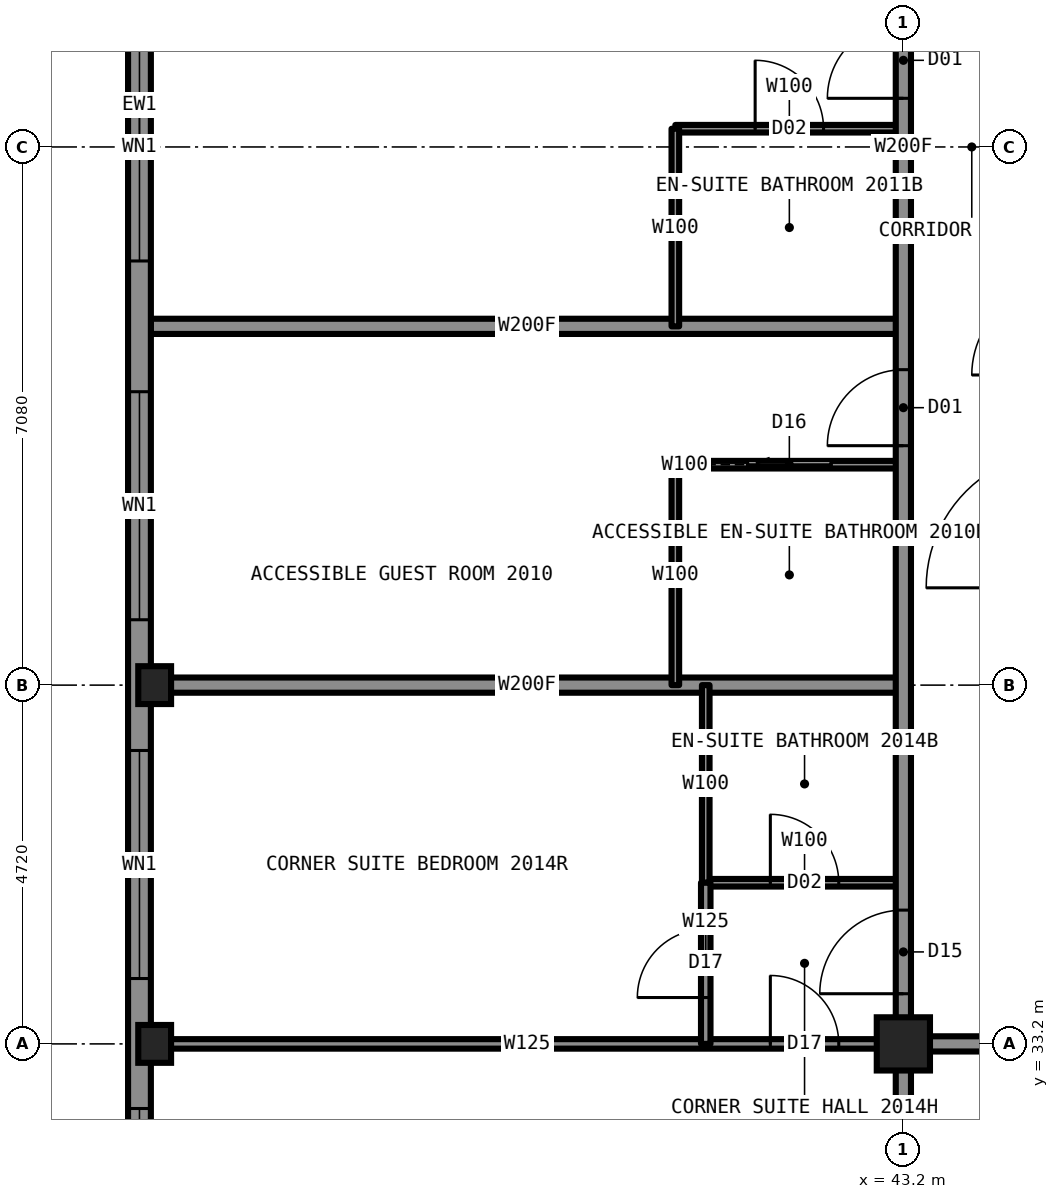
"""IFC4 building model, lengths in metres.
Left out: names, types, materials, properties, quantities, classifications, styles, units other than length and angle.
Written with IfcOpenShell. Run it as: python <this file> out.ifc"""

import sys

from ifc_helpers import new_model, si_unit, direction, frame, frame_2d, origin, origin_2d, place, context, subcontext, project, spatial, rectangle, hollow_rectangle, i_section, extrude, element, fill, save


model = new_model("IFC4")
c1 = context("Model", 3, precision=1e-05, world=origin(), true_north=direction((0.0, 1.0)))
c2 = subcontext(c1, "Body", "Model", "MODEL_VIEW")
j1 = project(units=[si_unit("LENGTHUNIT", "METRE"), si_unit("PLANEANGLEUNIT", "RADIAN")], contexts=[c1])
p1 = place(None, origin())
s1 = spatial("IfcSite", under=j1, at=p1, CompositionType="ELEMENT")
p2 = place(p1, origin())
s2 = spatial("IfcBuilding", under=s1, at=p2, CompositionType="ELEMENT")
p3 = place(p2, frame((0.0, 0.0, 70.5)))
s3 = spatial("IfcBuildingStorey", under=s2, at=p3, CompositionType="ELEMENT", Elevation=70.5)
for number, where, z_axis, x_axis in (
    (1, (33.35, 33.2, 0.0), (0.0, 0.0, 1.0), (1.0, 0.0, 0.0)),
    (2, (33.35, 37.92, 0.0), (0.0, 0.0, 1.0), (1.0, 0.0, 0.0)),
):
    element("IfcColumn", number, at=place(p3, frame(where, z_axis=z_axis, x_axis=x_axis)), inside=s3, PredefinedType="COLUMN", context=c2, shape_type="SweptSolid", body=[
        extrude(i_section(OverallWidth=0.432, OverallDepth=0.498, WebThickness=0.056, FlangeThickness=0.089, at=origin_2d()), origin(), (0.0, 0.0, 1.0), 3.5),
    ])
p4 = place(p3, frame((43.2, 33.2, 0.0), z_axis=(0.0, 0.0, 1.0), x_axis=(1.0, 0.0, 0.0)))
e3 = element("IfcColumn", 3, at=p4, inside=s3, PredefinedType="COLUMN", context=c2, shape_type="SweptSolid", body=[
    extrude(hollow_rectangle(XDim=0.7, YDim=0.7, WallThickness=0.06, at=origin_2d()), origin(), (0.0, 0.0, 1.0), 3.5),
])
p5 = place(p3, frame((43.2, 33.2, 0.0), z_axis=(0.0, 0.0, 1.0), x_axis=(1.0, 0.0, 0.0)))
e4 = element("IfcWall", 4, at=p5, inside=s3, PredefinedType="PARTITIONING", context=c2, shape_type="SweptSolid", body=[
    extrude(rectangle(XDim=23.6, YDim=0.2, at=frame_2d((11.8, 0.0))), origin(), (0.0, 0.0, 1.0), 3.33),
])
p6 = place(p5, frame((2.55, 0.0, 0.0)))
e5 = element("IfcOpeningElement", 5, at=p6, cuts=e4, PredefinedType="OPENING", context=c2, shape_type="SweptSolid", body=[
    extrude(rectangle(XDim=1.0, YDim=2.2, at=frame_2d((0.5, 1.1))), frame((0.0, 0.11, 0.0), z_axis=(0.0, -1.0, 0.0), x_axis=(1.0, 0.0, 0.0)), (0.0, 0.0, 1.0), 0.22),
])
p7 = place(p5, frame((5.12, 0.0, 0.0)))
e6 = element("IfcOpeningElement", 6, at=p7, cuts=e4, PredefinedType="OPENING", context=c2, shape_type="SweptSolid", body=[
    extrude(rectangle(XDim=1.0, YDim=2.2, at=frame_2d((0.5, 1.1))), frame((0.0, 0.11, 0.0), z_axis=(0.0, -1.0, 0.0), x_axis=(1.0, 0.0, 0.0)), (0.0, 0.0, 1.0), 0.22),
])
p8 = place(p5, frame((11.7, 0.0, 0.0)))
e7 = element("IfcOpeningElement", 7, at=p8, cuts=e4, PredefinedType="OPENING", context=c2, shape_type="SweptSolid", body=[
    extrude(rectangle(XDim=1.0, YDim=2.2, at=frame_2d((0.5, 1.1))), frame((0.0, 0.11, 0.0), z_axis=(0.0, -1.0, 0.0), x_axis=(1.0, 0.0, 0.0)), (0.0, 0.0, 1.0), 0.22),
])
p9 = place(p5, frame((16.42, 0.0, 0.0)))
e8 = element("IfcOpeningElement", 8, at=p9, cuts=e4, PredefinedType="OPENING", context=c2, shape_type="SweptSolid", body=[
    extrude(rectangle(XDim=1.0, YDim=2.2, at=frame_2d((0.5, 1.1))), frame((0.0, 0.11, 0.0), z_axis=(0.0, -1.0, 0.0), x_axis=(1.0, 0.0, 0.0)), (0.0, 0.0, 1.0), 0.22),
])
p10 = place(p5, frame((21.43, 0.0, 0.0)))
e9 = element("IfcOpeningElement", 9, at=p10, cuts=e4, PredefinedType="OPENING", context=c2, shape_type="SweptSolid", body=[
    extrude(rectangle(XDim=1.0, YDim=2.2, at=frame_2d((0.5, 1.1))), frame((0.0, 0.11, 0.0), z_axis=(0.0, -1.0, 0.0), x_axis=(1.0, 0.0, 0.0)), (0.0, 0.0, 1.0), 0.22),
])
p11 = place(p3, frame((33.3, 33.2, 0.0), z_axis=(0.0, 0.0, 1.0), x_axis=(1.0, 0.0, 0.0)))
e10 = element("IfcWall", 10, at=p11, inside=s3, PredefinedType="PARTITIONING", context=c2, shape_type="SweptSolid", body=[
    extrude(rectangle(XDim=9.9, YDim=0.125, at=frame_2d((4.95, 0.0))), origin(), (0.0, 0.0, 1.0), 2.573),
])
p12 = place(p11, frame((8.15, 0.0, 0.0)))
e11 = element("IfcOpeningElement", 11, at=p12, cuts=e10, PredefinedType="OPENING", context=c2, shape_type="SweptSolid", body=[
    extrude(rectangle(XDim=0.9, YDim=2.2, at=frame_2d((0.45, 1.1))), frame((0.0, 0.073, 0.0), z_axis=(0.0, -1.0, 0.0), x_axis=(1.0, 0.0, 0.0)), (0.0, 0.0, 1.0), 0.145),
])
p13 = place(p3, frame((33.3, 42.64, 0.0), z_axis=(0.0, 0.0, 1.0), x_axis=(1.0, 0.0, 0.0)))
e12 = element("IfcWall", 12, at=p13, inside=s3, PredefinedType="PARTITIONING", context=c2, shape_type="SweptSolid", body=[
    extrude(rectangle(XDim=9.9, YDim=0.2, at=frame_2d((4.95, 0.0))), origin(), (0.0, 0.0, 1.0), 2.723),
])
p14 = place(p3, frame((40.2, 40.82, 0.0), z_axis=(0.0, 0.0, 1.0), x_axis=(1.0, 0.0, 0.0)))
e13 = element("IfcWall", 13, at=p14, inside=s3, PredefinedType="PARTITIONING", context=c2, shape_type="SweptSolid", body=[
    extrude(rectangle(XDim=3.0, YDim=0.1, at=frame_2d((1.5, 0.0))), origin(), (0.0, 0.0, 1.0), 3.33),
])
p15 = place(p14, frame((0.95, 0.0, 0.0)))
e14 = element("IfcOpeningElement", 14, at=p15, cuts=e13, PredefinedType="OPENING", context=c2, shape_type="SweptSolid", body=[
    extrude(rectangle(XDim=1.1, YDim=2.1, at=frame_2d((0.55, 1.05))), frame((0.0, 0.06, 0.0), z_axis=(0.0, -1.0, 0.0), x_axis=(1.0, 0.0, 0.0)), (0.0, 0.0, 1.0), 0.12),
])
p16 = place(p3, frame((33.3, 37.92, 0.0), z_axis=(0.0, 0.0, 1.0), x_axis=(1.0, 0.0, 0.0)))
e15 = element("IfcWall", 15, at=p16, inside=s3, PredefinedType="PARTITIONING", context=c2, shape_type="SweptSolid", body=[
    extrude(rectangle(XDim=9.9, YDim=0.2, at=frame_2d((4.95, 0.0))), origin(), (0.0, 0.0, 1.0), 2.573),
])
p17 = place(p3, frame((40.6, 35.32, 0.0), z_axis=(0.0, 0.0, 1.0), x_axis=(1.0, 0.0, 0.0)))
e16 = element("IfcWall", 16, at=p17, inside=s3, PredefinedType="PARTITIONING", context=c2, shape_type="SweptSolid", body=[
    extrude(rectangle(XDim=2.6, YDim=0.1, at=frame_2d((1.3, 0.0))), origin(), (0.0, 0.0, 1.0), 3.33),
])
p18 = place(p17, frame((0.85, 0.0, 0.0)))
e17 = element("IfcOpeningElement", 17, at=p18, cuts=e16, PredefinedType="OPENING", context=c2, shape_type="SweptSolid", body=[
    extrude(rectangle(XDim=0.9, YDim=2.1, at=frame_2d((0.45, 1.05))), frame((0.0, 0.06, 0.0), z_axis=(0.0, -1.0, 0.0), x_axis=(1.0, 0.0, 0.0)), (0.0, 0.0, 1.0), 0.12),
])
p19 = place(p3, frame((40.2, 45.24, 0.0), z_axis=(0.0, 0.0, 1.0), x_axis=(1.0, 0.0, 0.0)))
e18 = element("IfcWall", 18, at=p19, inside=s3, PredefinedType="PARTITIONING", context=c2, shape_type="SweptSolid", body=[
    extrude(rectangle(XDim=3.0, YDim=0.1, at=frame_2d((1.5, 0.0))), origin(), (0.0, 0.0, 1.0), 3.33),
])
p20 = place(p19, frame((1.05, 0.0, 0.0)))
e19 = element("IfcOpeningElement", 19, at=p20, cuts=e18, PredefinedType="OPENING", context=c2, shape_type="SweptSolid", body=[
    extrude(rectangle(XDim=0.9, YDim=2.1, at=frame_2d((0.45, 1.05))), frame((0.0, 0.06, 0.0), z_axis=(0.0, -1.0, 0.0), x_axis=(1.0, 0.0, 0.0)), (0.0, 0.0, 1.0), 0.12),
])
p21 = place(p3, frame((43.2, 33.2, 0.0), z_axis=(0.0, 0.0, 1.0), x_axis=(0.0, 1.0, 0.0)))
e20 = element("IfcWall", 20, at=p21, inside=s3, PredefinedType="PARTITIONING", context=c2, shape_type="SweptSolid", body=[
    extrude(rectangle(XDim=23.6, YDim=0.2, at=frame_2d((11.8, 0.0))), origin(), (0.0, 0.0, 1.0), 3.33),
])
p22 = place(p21, frame((7.87, 0.0, 0.0)))
e21 = element("IfcOpeningElement", 21, at=p22, cuts=e20, PredefinedType="OPENING", context=c2, shape_type="SweptSolid", body=[
    extrude(rectangle(XDim=1.0, YDim=2.2, at=frame_2d((0.5, 1.1))), frame((0.0, 0.11, 0.0), z_axis=(0.0, -1.0, 0.0), x_axis=(1.0, 0.0, 0.0)), (0.0, 0.0, 1.0), 0.22),
])
p23 = place(p21, frame((12.44, 0.0, 0.0)))
e22 = element("IfcOpeningElement", 22, at=p23, cuts=e20, PredefinedType="OPENING", context=c2, shape_type="SweptSolid", body=[
    extrude(rectangle(XDim=1.0, YDim=2.2, at=frame_2d((0.5, 1.1))), frame((0.0, 0.11, 0.0), z_axis=(0.0, -1.0, 0.0), x_axis=(1.0, 0.0, 0.0)), (0.0, 0.0, 1.0), 0.22),
])
p24 = place(p21, frame((21.85, 0.0, 0.0)))
e23 = element("IfcOpeningElement", 23, at=p24, cuts=e20, PredefinedType="OPENING", context=c2, shape_type="SweptSolid", body=[
    extrude(rectangle(XDim=1.1, YDim=2.2, at=frame_2d((0.55, 1.1))), frame((0.0, 0.11, 0.0), z_axis=(0.0, -1.0, 0.0), x_axis=(1.0, 0.0, 0.0)), (0.0, 0.0, 1.0), 0.22),
])
p25 = place(p21, frame((0.66, 0.0, 0.0)))
e24 = element("IfcOpeningElement", 24, at=p25, cuts=e20, PredefinedType="OPENING", context=c2, shape_type="SweptSolid", body=[
    extrude(rectangle(XDim=1.1, YDim=2.2, at=frame_2d((0.55, 1.1))), frame((0.0, 0.11, 0.0), z_axis=(0.0, -1.0, 0.0), x_axis=(1.0, 0.0, 0.0)), (0.0, 0.0, 1.0), 0.22),
])
p26 = place(p3, frame((43.2, 23.3, 0.0), z_axis=(0.0, 0.0, 1.0), x_axis=(0.0, 1.0, 0.0)))
e25 = element("IfcWall", 25, at=p26, inside=s3, PredefinedType="PARTITIONING", context=c2, shape_type="SweptSolid", body=[
    extrude(rectangle(XDim=9.9, YDim=0.2, at=frame_2d((4.95, 0.0))), origin(), (0.0, 0.0, 1.0), 2.573),
])
p27 = place(p3, frame((40.6, 35.32, 0.0), z_axis=(0.0, 0.0, 1.0), x_axis=(0.0, 1.0, 0.0)))
e26 = element("IfcWall", 26, at=p27, inside=s3, PredefinedType="PARTITIONING", context=c2, shape_type="SweptSolid", body=[
    extrude(rectangle(XDim=2.6, YDim=0.1, at=frame_2d((1.3, 0.0))), origin(), (0.0, 0.0, 1.0), 3.33),
])
p28 = place(p3, frame((40.6, 33.2, 0.0), z_axis=(0.0, 0.0, 1.0), x_axis=(0.0, 1.0, 0.0)))
e27 = element("IfcWall", 27, at=p28, inside=s3, PredefinedType="PARTITIONING", context=c2, shape_type="SweptSolid", body=[
    extrude(rectangle(XDim=2.12, YDim=0.125, at=frame_2d((1.06, 0.0))), origin(), (0.0, 0.0, 1.0), 3.33),
])
p29 = place(p28, frame((0.61, 0.0, 0.0)))
e28 = element("IfcOpeningElement", 28, at=p29, cuts=e27, PredefinedType="OPENING", context=c2, shape_type="SweptSolid", body=[
    extrude(rectangle(XDim=0.9, YDim=2.2, at=frame_2d((0.45, 1.1))), frame((0.0, 0.073, 0.0), z_axis=(0.0, -1.0, 0.0), x_axis=(1.0, 0.0, 0.0)), (0.0, 0.0, 1.0), 0.145),
])
p30 = place(p3, frame((40.2, 37.92, 0.0), z_axis=(0.0, 0.0, 1.0), x_axis=(0.0, 1.0, 0.0)))
e29 = element("IfcWall", 29, at=p30, inside=s3, PredefinedType="PARTITIONING", context=c2, shape_type="SweptSolid", body=[
    extrude(rectangle(XDim=2.9, YDim=0.1, at=frame_2d((1.45, 0.0))), origin(), (0.0, 0.0, 1.0), 3.33),
])
p31 = place(p3, frame((40.2, 42.64, 0.0), z_axis=(0.0, 0.0, 1.0), x_axis=(0.0, 1.0, 0.0)))
e30 = element("IfcWall", 30, at=p31, inside=s3, PredefinedType="PARTITIONING", context=c2, shape_type="SweptSolid", body=[
    extrude(rectangle(XDim=2.6, YDim=0.1, at=frame_2d((1.3, 0.0))), origin(), (0.0, 0.0, 1.0), 3.33),
])
p32 = place(p3, frame((33.15, 61.5, 0.0), z_axis=(0.0, 0.0, 1.0), x_axis=(0.0, -1.0, 0.0)))
e31 = element("IfcWall", 31, at=p32, inside=s3, PredefinedType="SOLIDWALL", context=c2, shape_type="SweptSolid", body=[
    extrude(rectangle(XDim=33.0, YDim=0.3, at=frame_2d((16.5, 0.0))), origin(), (0.0, 0.0, 1.0), 2.83),
])
p33 = place(p32, frame((0.85, 0.0, 0.5)))
e32 = element("IfcOpeningElement", 32, at=p33, cuts=e31, PredefinedType="OPENING", context=c2, shape_type="SweptSolid", body=[
    extrude(rectangle(XDim=2.9, YDim=2.0, at=frame_2d((1.45, 1.0))), frame((0.0, 0.16, 0.0), z_axis=(0.0, -1.0, 0.0), x_axis=(1.0, 0.0, 0.0)), (0.0, 0.0, 1.0), 0.32),
])
p34 = place(p32, frame((6.96, 0.0, 0.55)))
e33 = element("IfcOpeningElement", 33, at=p34, cuts=e31, PredefinedType="OPENING", context=c2, shape_type="SweptSolid", body=[
    extrude(rectangle(XDim=1.6, YDim=1.9, at=frame_2d((0.8, 0.95))), frame((0.0, 0.16, 0.0), z_axis=(0.0, -1.0, 0.0), x_axis=(1.0, 0.0, 0.0)), (0.0, 0.0, 1.0), 0.32),
])
p35 = place(p32, frame((10.28, 0.0, 0.5)))
e34 = element("IfcOpeningElement", 34, at=p35, cuts=e31, PredefinedType="OPENING", context=c2, shape_type="SweptSolid", body=[
    extrude(rectangle(XDim=3.0, YDim=2.0, at=frame_2d((1.5, 1.0))), frame((0.0, 0.16, 0.0), z_axis=(0.0, -1.0, 0.0), x_axis=(1.0, 0.0, 0.0)), (0.0, 0.0, 1.0), 0.32),
])
p36 = place(p32, frame((15.0, 0.0, 0.5)))
e35 = element("IfcOpeningElement", 35, at=p36, cuts=e31, PredefinedType="OPENING", context=c2, shape_type="SweptSolid", body=[
    extrude(rectangle(XDim=3.0, YDim=2.0, at=frame_2d((1.5, 1.0))), frame((0.0, 0.16, 0.0), z_axis=(0.0, -1.0, 0.0), x_axis=(1.0, 0.0, 0.0)), (0.0, 0.0, 1.0), 0.32),
])
p37 = place(p32, frame((19.72, 0.0, 0.5)))
e36 = element("IfcOpeningElement", 36, at=p37, cuts=e31, PredefinedType="OPENING", context=c2, shape_type="SweptSolid", body=[
    extrude(rectangle(XDim=3.0, YDim=2.0, at=frame_2d((1.5, 1.0))), frame((0.0, 0.16, 0.0), z_axis=(0.0, -1.0, 0.0), x_axis=(1.0, 0.0, 0.0)), (0.0, 0.0, 1.0), 0.32),
])
p38 = place(p32, frame((24.44, 0.0, 0.55)))
e37 = element("IfcOpeningElement", 37, at=p38, cuts=e31, PredefinedType="OPENING", context=c2, shape_type="SweptSolid", body=[
    extrude(rectangle(XDim=1.6, YDim=1.9, at=frame_2d((0.8, 0.95))), frame((0.0, 0.16, 0.0), z_axis=(0.0, -1.0, 0.0), x_axis=(1.0, 0.0, 0.0)), (0.0, 0.0, 1.0), 0.32),
])
p39 = place(p32, frame((29.25, 0.0, 0.5)))
e38 = element("IfcOpeningElement", 38, at=p39, cuts=e31, PredefinedType="OPENING", context=c2, shape_type="SweptSolid", body=[
    extrude(rectangle(XDim=2.9, YDim=2.0, at=frame_2d((1.45, 1.0))), frame((0.0, 0.16, 0.0), z_axis=(0.0, -1.0, 0.0), x_axis=(1.0, 0.0, 0.0)), (0.0, 0.0, 1.0), 0.32),
])
p40 = place(p32, frame((6.31, 0.0, 1.45)))
e39 = element("IfcOpeningElement", 39, at=p40, cuts=e31, PredefinedType="OPENING", context=c2, shape_type="SweptSolid", body=[
    extrude(rectangle(XDim=0.6, YDim=1.0, at=frame_2d((0.3, 0.5))), frame((0.0, 0.16, 0.0), z_axis=(0.0, -1.0, 0.0), x_axis=(1.0, 0.0, 0.0)), (0.0, 0.0, 1.0), 0.32),
])
p41 = place(p32, frame((26.04, 0.0, 1.45)))
e40 = element("IfcOpeningElement", 40, at=p41, cuts=e31, PredefinedType="OPENING", context=c2, shape_type="SweptSolid", body=[
    extrude(rectangle(XDim=0.6, YDim=1.0, at=frame_2d((0.3, 0.5))), frame((0.0, 0.16, 0.0), z_axis=(0.0, -1.0, 0.0), x_axis=(1.0, 0.0, 0.0)), (0.0, 0.0, 1.0), 0.32),
])
p42 = place(p22, origin())
e41 = element("IfcDoor", 41, at=p42, inside=s3, OperationType="SINGLE_SWING_LEFT", PredefinedType="DOOR", context=c2, shape_type="SweptSolid", body=[
    extrude(rectangle(XDim=1.0, YDim=2.2, at=frame_2d((0.5, 1.1))), frame((0.0, 0.025, 0.0), z_axis=(0.0, -1.0, 0.0), x_axis=(1.0, 0.0, 0.0)), (0.0, 0.0, 1.0), 0.05),
])
fill(e21, e41)
p43 = place(p15, origin())
e42 = element("IfcDoor", 42, at=p43, inside=s3, OperationType="SLIDING_TO_LEFT", PredefinedType="DOOR", context=c2, shape_type="SweptSolid", body=[
    extrude(rectangle(XDim=1.1, YDim=2.1, at=frame_2d((0.55, 1.05))), frame((0.0, 0.025, 0.0), z_axis=(0.0, -1.0, 0.0), x_axis=(1.0, 0.0, 0.0)), (0.0, 0.0, 1.0), 0.05),
])
fill(e14, e42)
p44 = place(p23, origin())
e43 = element("IfcDoor", 43, at=p44, inside=s3, OperationType="SINGLE_SWING_LEFT", PredefinedType="DOOR", context=c2, shape_type="SweptSolid", body=[
    extrude(rectangle(XDim=1.0, YDim=2.2, at=frame_2d((0.5, 1.1))), frame((0.0, 0.025, 0.0), z_axis=(0.0, -1.0, 0.0), x_axis=(1.0, 0.0, 0.0)), (0.0, 0.0, 1.0), 0.05),
])
fill(e22, e43)
p45 = place(p20, origin())
e44 = element("IfcDoor", 44, at=p45, inside=s3, OperationType="SINGLE_SWING_RIGHT", PredefinedType="DOOR", context=c2, shape_type="SweptSolid", body=[
    extrude(rectangle(XDim=0.9, YDim=2.1, at=frame_2d((0.45, 1.05))), frame((0.0, 0.025, 0.0), z_axis=(0.0, -1.0, 0.0), x_axis=(1.0, 0.0, 0.0)), (0.0, 0.0, 1.0), 0.05),
])
fill(e19, e44)
p46 = place(p12, origin())
e45 = element("IfcDoor", 45, at=p46, inside=s3, OperationType="SINGLE_SWING_LEFT", PredefinedType="DOOR", context=c2, shape_type="SweptSolid", body=[
    extrude(rectangle(XDim=0.9, YDim=2.2, at=frame_2d((0.45, 1.1))), frame((0.0, 0.025, 0.0), z_axis=(0.0, -1.0, 0.0), x_axis=(1.0, 0.0, 0.0)), (0.0, 0.0, 1.0), 0.05),
])
fill(e11, e45)
p47 = place(p18, origin())
e46 = element("IfcDoor", 46, at=p47, inside=s3, OperationType="SINGLE_SWING_RIGHT", PredefinedType="DOOR", context=c2, shape_type="SweptSolid", body=[
    extrude(rectangle(XDim=0.9, YDim=2.1, at=frame_2d((0.45, 1.05))), frame((0.0, 0.025, 0.0), z_axis=(0.0, -1.0, 0.0), x_axis=(1.0, 0.0, 0.0)), (0.0, 0.0, 1.0), 0.05),
])
fill(e17, e46)
p48 = place(p25, origin())
e47 = element("IfcDoor", 47, at=p48, inside=s3, OperationType="SINGLE_SWING_LEFT", PredefinedType="DOOR", context=c2, shape_type="SweptSolid", body=[
    extrude(rectangle(XDim=1.1, YDim=2.2, at=frame_2d((0.55, 1.1))), frame((0.0, 0.025, 0.0), z_axis=(0.0, -1.0, 0.0), x_axis=(1.0, 0.0, 0.0)), (0.0, 0.0, 1.0), 0.05),
])
fill(e24, e47)
p49 = place(p29, origin())
e48 = element("IfcDoor", 48, at=p49, inside=s3, OperationType="SINGLE_SWING_LEFT", PredefinedType="DOOR", context=c2, shape_type="SweptSolid", body=[
    extrude(rectangle(XDim=0.9, YDim=2.2, at=frame_2d((0.45, 1.1))), frame((0.0, 0.025, 0.0), z_axis=(0.0, -1.0, 0.0), x_axis=(1.0, 0.0, 0.0)), (0.0, 0.0, 1.0), 0.05),
])
fill(e28, e48)
p50 = place(p36, origin())
e49 = element("IfcWindow", 49, at=p50, inside=s3, PartitioningType="SINGLE_PANEL", PredefinedType="WINDOW", context=c2, shape_type="SweptSolid", body=[
    extrude(rectangle(XDim=3.0, YDim=2.0, at=frame_2d((1.5, 1.0))), frame((0.0, 0.03, 0.0), z_axis=(0.0, -1.0, 0.0), x_axis=(1.0, 0.0, 0.0)), (0.0, 0.0, 1.0), 0.06),
])
fill(e35, e49)
p51 = place(p37, origin())
e50 = element("IfcWindow", 50, at=p51, inside=s3, PartitioningType="SINGLE_PANEL", PredefinedType="WINDOW", context=c2, shape_type="SweptSolid", body=[
    extrude(rectangle(XDim=3.0, YDim=2.0, at=frame_2d((1.5, 1.0))), frame((0.0, 0.03, 0.0), z_axis=(0.0, -1.0, 0.0), x_axis=(1.0, 0.0, 0.0)), (0.0, 0.0, 1.0), 0.06),
])
fill(e36, e50)
p52 = place(p38, origin())
e51 = element("IfcWindow", 51, at=p52, inside=s3, PartitioningType="SINGLE_PANEL", PredefinedType="WINDOW", context=c2, shape_type="SweptSolid", body=[
    extrude(rectangle(XDim=1.6, YDim=1.9, at=frame_2d((0.8, 0.95))), frame((0.0, 0.03, 0.0), z_axis=(0.0, -1.0, 0.0), x_axis=(1.0, 0.0, 0.0)), (0.0, 0.0, 1.0), 0.06),
])
fill(e37, e51)
p53 = place(p39, origin())
e52 = element("IfcWindow", 52, at=p53, inside=s3, PartitioningType="SINGLE_PANEL", PredefinedType="WINDOW", context=c2, shape_type="SweptSolid", body=[
    extrude(rectangle(XDim=2.9, YDim=2.0, at=frame_2d((1.45, 1.0))), frame((0.0, 0.03, 0.0), z_axis=(0.0, -1.0, 0.0), x_axis=(1.0, 0.0, 0.0)), (0.0, 0.0, 1.0), 0.06),
])
fill(e38, e52)
p54 = place(p41, origin())
e53 = element("IfcWindow", 53, at=p54, inside=s3, PartitioningType="SINGLE_PANEL", PredefinedType="WINDOW", context=c2, shape_type="SweptSolid", body=[
    extrude(rectangle(XDim=0.6, YDim=1.0, at=frame_2d((0.3, 0.5))), frame((0.0, 0.03, 0.0), z_axis=(0.0, -1.0, 0.0), x_axis=(1.0, 0.0, 0.0)), (0.0, 0.0, 1.0), 0.06),
])
fill(e40, e53)
save(model, sys.argv[1])
